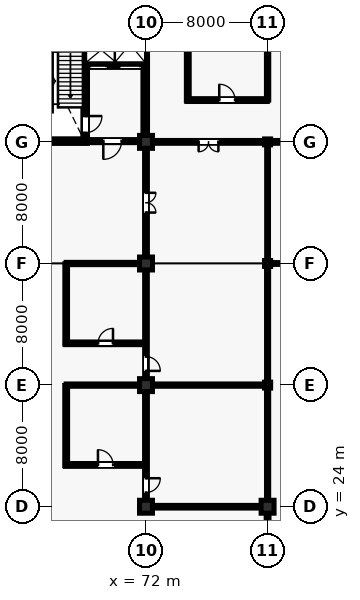
"""IFC4 building model, lengths in metres.
Left out: names, types, materials, properties, quantities, classifications, styles, units other than length and angle.
Written with IfcOpenShell. Run it as: python <this file> out.ifc"""

import sys

from ifc_helpers import new_model, si_unit, direction, frame, frame_2d, origin, origin_2d, place, context, subcontext, project, spatial, rectangle, i_section, extrude, element, fill, save


model = new_model("IFC4")
c1 = context("Model", 3, precision=1e-05, world=origin(), true_north=direction((0.0, 1.0)))
c2 = subcontext(c1, "Body", "Model", "MODEL_VIEW")
j1 = project(units=[si_unit("LENGTHUNIT", "METRE"), si_unit("PLANEANGLEUNIT", "RADIAN")], contexts=[c1])
p1 = place(None, origin())
s1 = spatial("IfcSite", under=j1, at=p1, CompositionType="ELEMENT")
p2 = place(p1, origin())
s2 = spatial("IfcBuilding", under=s1, at=p2, CompositionType="ELEMENT")
p3 = place(p2, origin())
s3 = spatial("IfcBuildingStorey", under=s2, at=p3, CompositionType="ELEMENT", Elevation=0.0)
for number, where, z_axis, x_axis in (
    (1, (72.0, 24.0, 0.0), (0.0, 0.0, 1.0), (1.0, 0.0, 0.0)),
    (2, (72.0, 32.0, 0.0), (0.0, 0.0, 1.0), (1.0, 0.0, 0.0)),
    (3, (72.0, 40.0, 0.0), (0.0, 0.0, 1.0), (1.0, 0.0, 0.0)),
    (4, (72.0, 48.0, 0.0), (0.0, 0.0, 1.0), (1.0, 0.0, 0.0)),
    (5, (80.0, 24.0, 0.0), (0.0, 0.0, 1.0), (1.0, 0.0, 0.0)),
):
    element("IfcColumn", number, at=place(p3, frame(where, z_axis=z_axis, x_axis=x_axis)), inside=s3, PredefinedType="COLUMN", context=c2, shape_type="SweptSolid", body=[
        extrude(rectangle(XDim=0.85, YDim=0.85, at=origin_2d()), origin(), (0.0, 0.0, 1.0), 5.28),
    ])
for number, where, z_axis, x_axis in (
    (6, (80.0, 32.0, 0.0), (0.0, 0.0, 1.0), (1.0, 0.0, 0.0)),
    (7, (80.0, 40.0, 0.0), (0.0, 0.0, 1.0), (1.0, 0.0, 0.0)),
    (8, (80.0, 48.0, 0.0), (0.0, 0.0, 1.0), (1.0, 0.0, 0.0)),
):
    element("IfcColumn", number, at=place(p3, frame(where, z_axis=z_axis, x_axis=x_axis)), inside=s3, PredefinedType="COLUMN", context=c2, shape_type="SweptSolid", body=[
        extrude(i_section(OverallWidth=0.398, OverallDepth=0.387, WebThickness=0.021, FlangeThickness=0.033, FilletRadius=0.015, at=origin_2d()), origin(), (0.0, 0.0, 1.0), 5.28),
    ])
p4 = place(p3, frame((71.95, 48.315, 0.0), z_axis=(0.0, 0.0, 1.0), x_axis=(0.0, 1.0, 0.0)))
e9 = element("IfcWall", 9, at=p4, inside=s3, PredefinedType="SHEAR", context=c2, shape_type="SweptSolid", body=[
    extrude(rectangle(XDim=7.37, YDim=0.3, at=frame_2d((3.685, 0.0))), origin(), (0.0, 0.0, 1.0), 5.035),
])
p5 = place(p3, frame((64.29, 48.05, 0.0), z_axis=(0.0, 0.0, 1.0), x_axis=(1.0, 0.0, 0.0)))
e10 = element("IfcWall", 10, at=p5, inside=s3, PredefinedType="SHEAR", context=c2, shape_type="SweptSolid", body=[
    extrude(rectangle(XDim=3.86, YDim=0.3, at=frame_2d((1.93, 0.0))), origin(), (0.0, 0.0, 1.0), 5.035),
])
p6 = place(p3, frame((68.0, 48.05, 0.0), z_axis=(0.0, 0.0, 1.0), x_axis=(0.0, 1.0, 0.0)))
e11 = element("IfcWall", 11, at=p6, inside=s3, PredefinedType="SHEAR", context=c2, shape_type="SweptSolid", body=[
    extrude(rectangle(XDim=7.9, YDim=0.3, at=frame_2d((3.95, 0.0))), origin(), (0.0, 0.0, 1.0), 5.035),
])
p7 = place(p6, frame((0.55, 0.0, 0.0)))
e12 = element("IfcOpeningElement", 12, at=p7, cuts=e11, PredefinedType="OPENING", context=c2, shape_type="SweptSolid", body=[
    extrude(rectangle(XDim=1.1, YDim=2.15, at=frame_2d((0.55, 1.075))), frame((0.0, 0.16, 0.0), z_axis=(0.0, -1.0, 0.0), x_axis=(1.0, 0.0, 0.0)), (0.0, 0.0, 1.0), 0.32),
])
p8 = place(p3, frame((68.0, 53.05, 0.0), z_axis=(0.0, 0.0, 1.0), x_axis=(1.0, 0.0, 0.0)))
e13 = element("IfcWall", 13, at=p8, inside=s3, PredefinedType="SHEAR", context=c2, shape_type="SweptSolid", body=[
    extrude(rectangle(XDim=3.95, YDim=0.3, at=frame_2d((1.975, 0.0))), origin(), (0.0, 0.0, 1.0), 5.035),
])
p9 = place(p8, frame((0.32, 0.0, 0.0)))
e14 = element("IfcOpeningElement", 14, at=p9, cuts=e13, PredefinedType="OPENING", context=c2, shape_type="SweptSolid", body=[
    extrude(rectangle(XDim=1.1, YDim=2.2, at=frame_2d((0.55, 1.1))), frame((0.0, 0.16, 0.0), z_axis=(0.0, -1.0, 0.0), x_axis=(1.0, 0.0, 0.0)), (0.0, 0.0, 1.0), 0.32),
])
p10 = place(p8, frame((2.28, 0.0, 0.0)))
e15 = element("IfcOpeningElement", 15, at=p10, cuts=e13, PredefinedType="OPENING", context=c2, shape_type="SweptSolid", body=[
    extrude(rectangle(XDim=1.35, YDim=2.3, at=frame_2d((0.675, 1.15))), frame((0.0, 0.16, 0.0), z_axis=(0.0, -1.0, 0.0), x_axis=(1.0, 0.0, 0.0)), (0.0, 0.0, 1.0), 0.32),
])
p11 = place(p3, frame((69.98, 53.05, 0.0), z_axis=(0.0, 0.0, 1.0), x_axis=(0.0, 1.0, 0.0)))
e16 = element("IfcWall", 16, at=p11, inside=s3, PredefinedType="SHEAR", context=c2, shape_type="SweptSolid", body=[
    extrude(rectangle(XDim=2.9, YDim=0.3, at=frame_2d((1.45, 0.0))), origin(), (0.0, 0.0, 1.0), 5.035),
])
p12 = place(p3, frame((68.0, 48.05, 0.0), z_axis=(0.0, 0.0, 1.0), x_axis=(1.0, 0.0, 0.0)))
e17 = element("IfcWall", 17, at=p12, inside=s3, PredefinedType="PARTITIONING", context=c2, shape_type="SweptSolid", body=[
    extrude(rectangle(XDim=3.585, YDim=0.2, at=frame_2d((1.792, 0.0))), origin(), (0.0, 0.0, 1.0), 4.336),
])
p13 = place(p12, frame((1.192, 0.0, 0.0)))
e18 = element("IfcOpeningElement", 18, at=p13, cuts=e17, PredefinedType="OPENING", context=c2, shape_type="SweptSolid", body=[
    extrude(rectangle(XDim=1.2, YDim=2.15, at=frame_2d((0.6, 1.075))), frame((0.0, 0.11, 0.0), z_axis=(0.0, -1.0, 0.0), x_axis=(1.0, 0.0, 0.0)), (0.0, 0.0, 1.0), 0.22),
])
p14 = place(p3, frame((66.7, 26.75, 0.0), z_axis=(0.0, 0.0, 1.0), x_axis=(1.0, 0.0, 0.0)))
e19 = element("IfcWall", 19, at=p14, inside=s3, PredefinedType="PARTITIONING", context=c2, shape_type="SweptSolid", body=[
    extrude(rectangle(XDim=5.28, YDim=0.185, at=frame_2d((2.64, 0.0))), origin(), (0.0, 0.0, 1.0), 4.403),
])
p15 = place(p14, frame((2.14, 0.0, 0.0)))
e20 = element("IfcOpeningElement", 20, at=p15, cuts=e19, PredefinedType="OPENING", context=c2, shape_type="SweptSolid", body=[
    extrude(rectangle(XDim=1.0, YDim=2.15, at=frame_2d((0.5, 1.075))), frame((0.0, 0.103, 0.0), z_axis=(0.0, -1.0, 0.0), x_axis=(1.0, 0.0, 0.0)), (0.0, 0.0, 1.0), 0.205),
])
p16 = place(p3, frame((66.75, 26.7, 0.0), z_axis=(0.0, 0.0, 1.0), x_axis=(0.0, 1.0, 0.0)))
e21 = element("IfcWall", 21, at=p16, inside=s3, PredefinedType="PARTITIONING", context=c2, shape_type="SweptSolid", body=[
    extrude(rectangle(XDim=5.28, YDim=0.185, at=frame_2d((2.64, 0.0))), origin(), (0.0, 0.0, 1.0), 4.327),
])
p17 = place(p3, frame((66.75, 32.0, 0.0), z_axis=(0.0, 0.0, 1.0), x_axis=(1.0, 0.0, 0.0)))
e22 = element("IfcWall", 22, at=p17, inside=s3, PredefinedType="PARTITIONING", context=c2, shape_type="SweptSolid", body=[
    extrude(rectangle(XDim=4.815, YDim=0.15, at=frame_2d((2.407, 0.0))), origin(), (0.0, 0.0, 1.0), 4.327),
])
p18 = place(p3, frame((66.7, 34.75, 0.0), z_axis=(0.0, 0.0, 1.0), x_axis=(1.0, 0.0, 0.0)))
e23 = element("IfcWall", 23, at=p18, inside=s3, PredefinedType="PARTITIONING", context=c2, shape_type="SweptSolid", body=[
    extrude(rectangle(XDim=5.28, YDim=0.175, at=frame_2d((2.64, 0.0))), origin(), (0.0, 0.0, 1.0), 4.412),
])
p19 = place(p18, frame((2.15, 0.0, 0.0)))
e24 = element("IfcOpeningElement", 24, at=p19, cuts=e23, PredefinedType="OPENING", context=c2, shape_type="SweptSolid", body=[
    extrude(rectangle(XDim=0.98, YDim=2.15, at=frame_2d((0.49, 1.075))), frame((0.0, 0.097, 0.0), z_axis=(0.0, -1.0, 0.0), x_axis=(1.0, 0.0, 0.0)), (0.0, 0.0, 1.0), 0.195),
])
p20 = place(p3, frame((66.75, 34.7, 0.0), z_axis=(0.0, 0.0, 1.0), x_axis=(0.0, 1.0, 0.0)))
e25 = element("IfcWall", 25, at=p20, inside=s3, PredefinedType="PARTITIONING", context=c2, shape_type="SweptSolid", body=[
    extrude(rectangle(XDim=5.28, YDim=0.175, at=frame_2d((2.64, 0.0))), origin(), (0.0, 0.0, 1.0), 4.403),
])
p21 = place(p3, frame((66.75, 40.0, 0.0), z_axis=(0.0, 0.0, 1.0), x_axis=(1.0, 0.0, 0.0)))
e26 = element("IfcWall", 26, at=p21, inside=s3, PredefinedType="PARTITIONING", context=c2, shape_type="SweptSolid", body=[
    extrude(rectangle(XDim=4.815, YDim=0.15, at=frame_2d((2.407, 0.0))), origin(), (0.0, 0.0, 1.0), 4.403),
])
p22 = place(p3, frame((74.7, 50.75, 0.0), z_axis=(0.0, 0.0, 1.0), x_axis=(1.0, 0.0, 0.0)))
e27 = element("IfcWall", 27, at=p22, inside=s3, PredefinedType="PARTITIONING", context=c2, shape_type="SweptSolid", body=[
    extrude(rectangle(XDim=5.28, YDim=0.185, at=frame_2d((2.64, 0.0))), origin(), (0.0, 0.0, 1.0), 4.403),
])
p23 = place(p22, frame((2.12, 0.0, 0.0)))
e28 = element("IfcOpeningElement", 28, at=p23, cuts=e27, PredefinedType="OPENING", context=c2, shape_type="SweptSolid", body=[
    extrude(rectangle(XDim=1.04, YDim=2.18, at=frame_2d((0.52, 1.09))), frame((0.0, 0.103, 0.0), z_axis=(0.0, -1.0, 0.0), x_axis=(1.0, 0.0, 0.0)), (0.0, 0.0, 1.0), 0.205),
])
p24 = place(p3, frame((74.75, 50.7, 0.0), z_axis=(0.0, 0.0, 1.0), x_axis=(0.0, 1.0, 0.0)))
e29 = element("IfcWall", 29, at=p24, inside=s3, PredefinedType="PARTITIONING", context=c2, shape_type="SweptSolid", body=[
    extrude(rectangle(XDim=5.28, YDim=0.185, at=frame_2d((2.64, 0.0))), origin(), (0.0, 0.0, 1.0), 4.327),
])
p25 = place(p3, frame((80.0, 50.75, 0.0), z_axis=(0.0, 0.0, 1.0), x_axis=(0.0, 1.0, 0.0)))
e30 = element("IfcWall", 30, at=p25, inside=s3, PredefinedType="PARTITIONING", context=c2, shape_type="SweptSolid", body=[
    extrude(rectangle(XDim=5.046, YDim=0.15, at=frame_2d((2.523, 0.0))), origin(), (0.0, 0.0, 1.0), 4.403),
])
p26 = place(p3, frame((72.0, 24.415, 0.0), z_axis=(0.0, 0.0, 1.0), x_axis=(0.0, 1.0, 0.0)))
e31 = element("IfcWall", 31, at=p26, inside=s3, PredefinedType="PARTITIONING", context=c2, shape_type="SweptSolid", body=[
    extrude(rectangle(XDim=7.17, YDim=0.185, at=frame_2d((3.585, 0.0))), origin(), (0.0, 0.0, 1.0), 4.403),
])
p27 = place(p26, frame((0.52, 0.0, 0.0)))
e32 = element("IfcOpeningElement", 32, at=p27, cuts=e31, PredefinedType="OPENING", context=c2, shape_type="SweptSolid", body=[
    extrude(rectangle(XDim=0.94, YDim=2.12, at=frame_2d((0.47, 1.06))), frame((0.0, 0.103, 0.0), z_axis=(0.0, -1.0, 0.0), x_axis=(1.0, 0.0, 0.0)), (0.0, 0.0, 1.0), 0.205),
])
p28 = place(p3, frame((72.0, 32.415, 0.0), z_axis=(0.0, 0.0, 1.0), x_axis=(0.0, 1.0, 0.0)))
e33 = element("IfcWall", 33, at=p28, inside=s3, PredefinedType="PARTITIONING", context=c2, shape_type="SweptSolid", body=[
    extrude(rectangle(XDim=7.17, YDim=0.175, at=frame_2d((3.585, 0.0))), origin(), (0.0, 0.0, 1.0), 4.412),
])
p29 = place(p28, frame((0.52, 0.0, 0.0)))
e34 = element("IfcOpeningElement", 34, at=p29, cuts=e33, PredefinedType="OPENING", context=c2, shape_type="SweptSolid", body=[
    extrude(rectangle(XDim=0.94, YDim=2.12, at=frame_2d((0.47, 1.06))), frame((0.0, 0.097, 0.0), z_axis=(0.0, -1.0, 0.0), x_axis=(1.0, 0.0, 0.0)), (0.0, 0.0, 1.0), 0.195),
])
p30 = place(p3, frame((72.0, 40.415, 0.0), z_axis=(0.0, 0.0, 1.0), x_axis=(0.0, 1.0, 0.0)))
e35 = element("IfcWall", 35, at=p30, inside=s3, PredefinedType="PARTITIONING", context=c2, shape_type="SweptSolid", body=[
    extrude(rectangle(XDim=7.17, YDim=0.185, at=frame_2d((3.585, 0.0))), origin(), (0.0, 0.0, 1.0), 4.404),
])
p31 = place(p30, frame((2.935, 0.0, 0.0)))
e36 = element("IfcOpeningElement", 36, at=p31, cuts=e35, PredefinedType="OPENING", context=c2, shape_type="SweptSolid", body=[
    extrude(rectangle(XDim=1.3, YDim=2.2, at=frame_2d((0.65, 1.1))), frame((0.0, 0.103, 0.0), z_axis=(0.0, -1.0, 0.0), x_axis=(1.0, 0.0, 0.0)), (0.0, 0.0, 1.0), 0.205),
])
p32 = place(p3, frame((80.0, 16.415, 0.0), z_axis=(0.0, 0.0, 1.0), x_axis=(0.0, 1.0, 0.0)))
e37 = element("IfcWall", 37, at=p32, inside=s3, PredefinedType="PARTITIONING", context=c2, shape_type="SweptSolid", body=[
    extrude(rectangle(XDim=7.17, YDim=0.185, at=frame_2d((3.585, 0.0))), origin(), (0.0, 0.0, 1.0), 4.603),
])
p33 = place(p32, frame((2.935, 0.0, 0.0)))
e38 = element("IfcOpeningElement", 38, at=p33, cuts=e37, PredefinedType="OPENING", context=c2, shape_type="SweptSolid", body=[
    extrude(rectangle(XDim=1.3, YDim=2.2, at=frame_2d((0.65, 1.1))), frame((0.0, 0.103, 0.0), z_axis=(0.0, -1.0, 0.0), x_axis=(1.0, 0.0, 0.0)), (0.0, 0.0, 1.0), 0.205),
])
p34 = place(p3, frame((72.415, 24.0, 0.0), z_axis=(0.0, 0.0, 1.0), x_axis=(1.0, 0.0, 0.0)))
e39 = element("IfcWall", 39, at=p34, inside=s3, PredefinedType="PARTITIONING", context=c2, shape_type="SweptSolid", body=[
    extrude(rectangle(XDim=7.17, YDim=0.175, at=frame_2d((3.585, 0.0))), origin(), (0.0, 0.0, 1.0), 4.327),
])
p35 = place(p3, frame((80.0, 24.415, 0.0), z_axis=(0.0, 0.0, 1.0), x_axis=(0.0, 1.0, 0.0)))
e40 = element("IfcWall", 40, at=p35, inside=s3, PredefinedType="PARTITIONING", context=c2, shape_type="SweptSolid", body=[
    extrude(rectangle(XDim=7.401, YDim=0.142, at=frame_2d((3.701, 0.0))), origin(), (0.0, 0.0, 1.0), 4.667),
])
p36 = place(p3, frame((72.415, 32.0, 0.0), z_axis=(0.0, 0.0, 1.0), x_axis=(1.0, 0.0, 0.0)))
e41 = element("IfcWall", 41, at=p36, inside=s3, PredefinedType="PARTITIONING", context=c2, shape_type="SweptSolid", body=[
    extrude(rectangle(XDim=7.396, YDim=0.15, at=frame_2d((3.698, 0.0))), origin(), (0.0, 0.0, 1.0), 4.403),
])
p37 = place(p3, frame((80.0, 32.184, 0.0), z_axis=(0.0, 0.0, 1.0), x_axis=(0.0, 1.0, 0.0)))
e42 = element("IfcWall", 42, at=p37, inside=s3, PredefinedType="PARTITIONING", context=c2, shape_type="SweptSolid", body=[
    extrude(rectangle(XDim=7.633, YDim=0.135, at=frame_2d((3.816, 0.0))), origin(), (0.0, 0.0, 1.0), 4.607),
])
p38 = place(p3, frame((80.0, 40.184, 0.0), z_axis=(0.0, 0.0, 1.0), x_axis=(0.0, 1.0, 0.0)))
e43 = element("IfcWall", 43, at=p38, inside=s3, PredefinedType="PARTITIONING", context=c2, shape_type="SweptSolid", body=[
    extrude(rectangle(XDim=7.633, YDim=0.12, at=frame_2d((3.816, 0.0))), origin(), (0.0, 0.0, 1.0), 4.471),
])
p39 = place(p3, frame((72.415, 48.0, 0.0), z_axis=(0.0, 0.0, 1.0), x_axis=(1.0, 0.0, 0.0)))
e44 = element("IfcWall", 44, at=p39, inside=s3, PredefinedType="PARTITIONING", context=c2, shape_type="SweptSolid", body=[
    extrude(rectangle(XDim=7.396, YDim=0.185, at=frame_2d((3.698, 0.0))), origin(), (0.0, 0.0, 1.0), 4.404),
])
p40 = place(p39, frame((3.048, 0.0, 0.0)))
e45 = element("IfcOpeningElement", 45, at=p40, cuts=e44, PredefinedType="OPENING", context=c2, shape_type="SweptSolid", body=[
    extrude(rectangle(XDim=1.3, YDim=2.2, at=frame_2d((0.65, 1.1))), frame((0.0, 0.103, 0.0), z_axis=(0.0, -1.0, 0.0), x_axis=(1.0, 0.0, 0.0)), (0.0, 0.0, 1.0), 0.205),
])
p41 = place(p3, frame((80.189, 40.0, 0.0), z_axis=(0.0, 0.0, 1.0), x_axis=(1.0, 0.0, 0.0)))
e46 = element("IfcWall", 46, at=p41, inside=s3, PredefinedType="PARTITIONING", context=c2, shape_type="SweptSolid", body=[
    extrude(rectangle(XDim=7.811, YDim=0.12, at=frame_2d((3.906, 0.0))), origin(), (0.0, 0.0, 1.0), 4.262),
])
p42 = place(p3, frame((80.189, 48.0, 0.0), z_axis=(0.0, 0.0, 1.0), x_axis=(1.0, 0.0, 0.0)))
e47 = element("IfcWall", 47, at=p42, inside=s3, PredefinedType="PARTITIONING", context=c2, shape_type="SweptSolid", body=[
    extrude(rectangle(XDim=7.811, YDim=0.185, at=frame_2d((3.906, 0.0))), origin(), (0.0, 0.0, 1.0), 4.097),
])
p43 = place(p42, frame((3.256, 0.0, 0.0)))
e48 = element("IfcOpeningElement", 48, at=p43, cuts=e47, PredefinedType="OPENING", context=c2, shape_type="SweptSolid", body=[
    extrude(rectangle(XDim=1.3, YDim=2.2, at=frame_2d((0.65, 1.1))), frame((0.0, 0.103, 0.0), z_axis=(0.0, -1.0, 0.0), x_axis=(1.0, 0.0, 0.0)), (0.0, 0.0, 1.0), 0.205),
])
p44 = place(p7, frame((1.1, 0.0, 0.0), z_axis=(0.0, 0.0, 1.0), x_axis=(-1.0, 0.0, 0.0)))
e49 = element("IfcDoor", 49, at=p44, inside=s3, OperationType="SINGLE_SWING_RIGHT", PredefinedType="DOOR", context=c2, shape_type="SweptSolid", body=[
    extrude(rectangle(XDim=1.1, YDim=2.15, at=frame_2d((0.55, 1.075))), frame((0.0, 0.025, 0.0), z_axis=(0.0, -1.0, 0.0), x_axis=(1.0, 0.0, 0.0)), (0.0, 0.0, 1.0), 0.05),
])
fill(e12, e49)
p45 = place(p9, origin())
e50 = element("IfcDoor", 50, at=p45, inside=s3, OperationType="SLIDING_TO_LEFT", PredefinedType="DOOR", context=c2, shape_type="SweptSolid", body=[
    extrude(rectangle(XDim=1.1, YDim=2.2, at=frame_2d((0.55, 1.1))), frame((0.0, 0.025, 0.0), z_axis=(0.0, -1.0, 0.0), x_axis=(1.0, 0.0, 0.0)), (0.0, 0.0, 1.0), 0.05),
])
fill(e14, e50)
p46 = place(p10, origin())
e51 = element("IfcDoor", 51, at=p46, inside=s3, OperationType="DOUBLE_DOOR_SLIDING", PredefinedType="DOOR", context=c2, shape_type="SweptSolid", body=[
    extrude(rectangle(XDim=1.35, YDim=2.3, at=frame_2d((0.675, 1.15))), frame((0.0, 0.025, 0.0), z_axis=(0.0, -1.0, 0.0), x_axis=(1.0, 0.0, 0.0)), (0.0, 0.0, 1.0), 0.05),
])
fill(e15, e51)
p47 = place(p13, frame((1.2, 0.0, 0.0), z_axis=(0.0, 0.0, 1.0), x_axis=(-1.0, 0.0, 0.0)))
e52 = element("IfcDoor", 52, at=p47, inside=s3, OperationType="SINGLE_SWING_LEFT", PredefinedType="DOOR", context=c2, shape_type="SweptSolid", body=[
    extrude(rectangle(XDim=1.2, YDim=2.15, at=frame_2d((0.6, 1.075))), frame((0.0, 0.025, 0.0), z_axis=(0.0, -1.0, 0.0), x_axis=(1.0, 0.0, 0.0)), (0.0, 0.0, 1.0), 0.05),
])
fill(e18, e52)
p48 = place(p15, origin())
e53 = element("IfcDoor", 53, at=p48, inside=s3, OperationType="SINGLE_SWING_LEFT", PredefinedType="DOOR", context=c2, shape_type="SweptSolid", body=[
    extrude(rectangle(XDim=1.0, YDim=2.15, at=frame_2d((0.5, 1.075))), frame((0.0, 0.025, 0.0), z_axis=(0.0, -1.0, 0.0), x_axis=(1.0, 0.0, 0.0)), (0.0, 0.0, 1.0), 0.05),
])
fill(e20, e53)
p49 = place(p19, origin())
e54 = element("IfcDoor", 54, at=p49, inside=s3, OperationType="SINGLE_SWING_RIGHT", PredefinedType="DOOR", context=c2, shape_type="SweptSolid", body=[
    extrude(rectangle(XDim=0.98, YDim=2.15, at=frame_2d((0.49, 1.075))), frame((0.0, 0.025, 0.0), z_axis=(0.0, -1.0, 0.0), x_axis=(1.0, 0.0, 0.0)), (0.0, 0.0, 1.0), 0.05),
])
fill(e24, e54)
p50 = place(p23, origin())
e55 = element("IfcDoor", 55, at=p50, inside=s3, OperationType="SINGLE_SWING_LEFT", PredefinedType="DOOR", context=c2, shape_type="SweptSolid", body=[
    extrude(rectangle(XDim=1.04, YDim=2.18, at=frame_2d((0.52, 1.09))), frame((0.0, 0.025, 0.0), z_axis=(0.0, -1.0, 0.0), x_axis=(1.0, 0.0, 0.0)), (0.0, 0.0, 1.0), 0.05),
])
fill(e28, e55)
p51 = place(p27, frame((0.94, 0.0, 0.0), z_axis=(0.0, 0.0, 1.0), x_axis=(-1.0, 0.0, 0.0)))
e56 = element("IfcDoor", 56, at=p51, inside=s3, OperationType="SINGLE_SWING_RIGHT", PredefinedType="DOOR", context=c2, shape_type="SweptSolid", body=[
    extrude(rectangle(XDim=0.94, YDim=2.12, at=frame_2d((0.47, 1.06))), frame((0.0, 0.025, 0.0), z_axis=(0.0, -1.0, 0.0), x_axis=(1.0, 0.0, 0.0)), (0.0, 0.0, 1.0), 0.05),
])
fill(e32, e56)
p52 = place(p29, frame((0.94, 0.0, 0.0), z_axis=(0.0, 0.0, 1.0), x_axis=(-1.0, 0.0, 0.0)))
e57 = element("IfcDoor", 57, at=p52, inside=s3, OperationType="SINGLE_SWING_LEFT", PredefinedType="DOOR", context=c2, shape_type="SweptSolid", body=[
    extrude(rectangle(XDim=0.94, YDim=2.12, at=frame_2d((0.47, 1.06))), frame((0.0, 0.025, 0.0), z_axis=(0.0, -1.0, 0.0), x_axis=(1.0, 0.0, 0.0)), (0.0, 0.0, 1.0), 0.05),
])
fill(e34, e57)
p53 = place(p31, frame((1.3, 0.0, 0.0), z_axis=(0.0, 0.0, 1.0), x_axis=(-1.0, 0.0, 0.0)))
e58 = element("IfcDoor", 58, at=p53, inside=s3, OperationType="DOUBLE_DOOR_SINGLE_SWING", PredefinedType="DOOR", context=c2, shape_type="SweptSolid", body=[
    extrude(rectangle(XDim=1.3, YDim=2.2, at=frame_2d((0.65, 1.1))), frame((0.0, 0.025, 0.0), z_axis=(0.0, -1.0, 0.0), x_axis=(1.0, 0.0, 0.0)), (0.0, 0.0, 1.0), 0.05),
])
fill(e36, e58)
p54 = place(p40, frame((1.3, 0.0, 0.0), z_axis=(0.0, 0.0, 1.0), x_axis=(-1.0, 0.0, 0.0)))
e59 = element("IfcDoor", 59, at=p54, inside=s3, OperationType="DOUBLE_DOOR_SINGLE_SWING", PredefinedType="DOOR", context=c2, shape_type="SweptSolid", body=[
    extrude(rectangle(XDim=1.3, YDim=2.2, at=frame_2d((0.65, 1.1))), frame((0.0, 0.025, 0.0), z_axis=(0.0, -1.0, 0.0), x_axis=(1.0, 0.0, 0.0)), (0.0, 0.0, 1.0), 0.05),
])
fill(e45, e59)
save(model, sys.argv[1])
